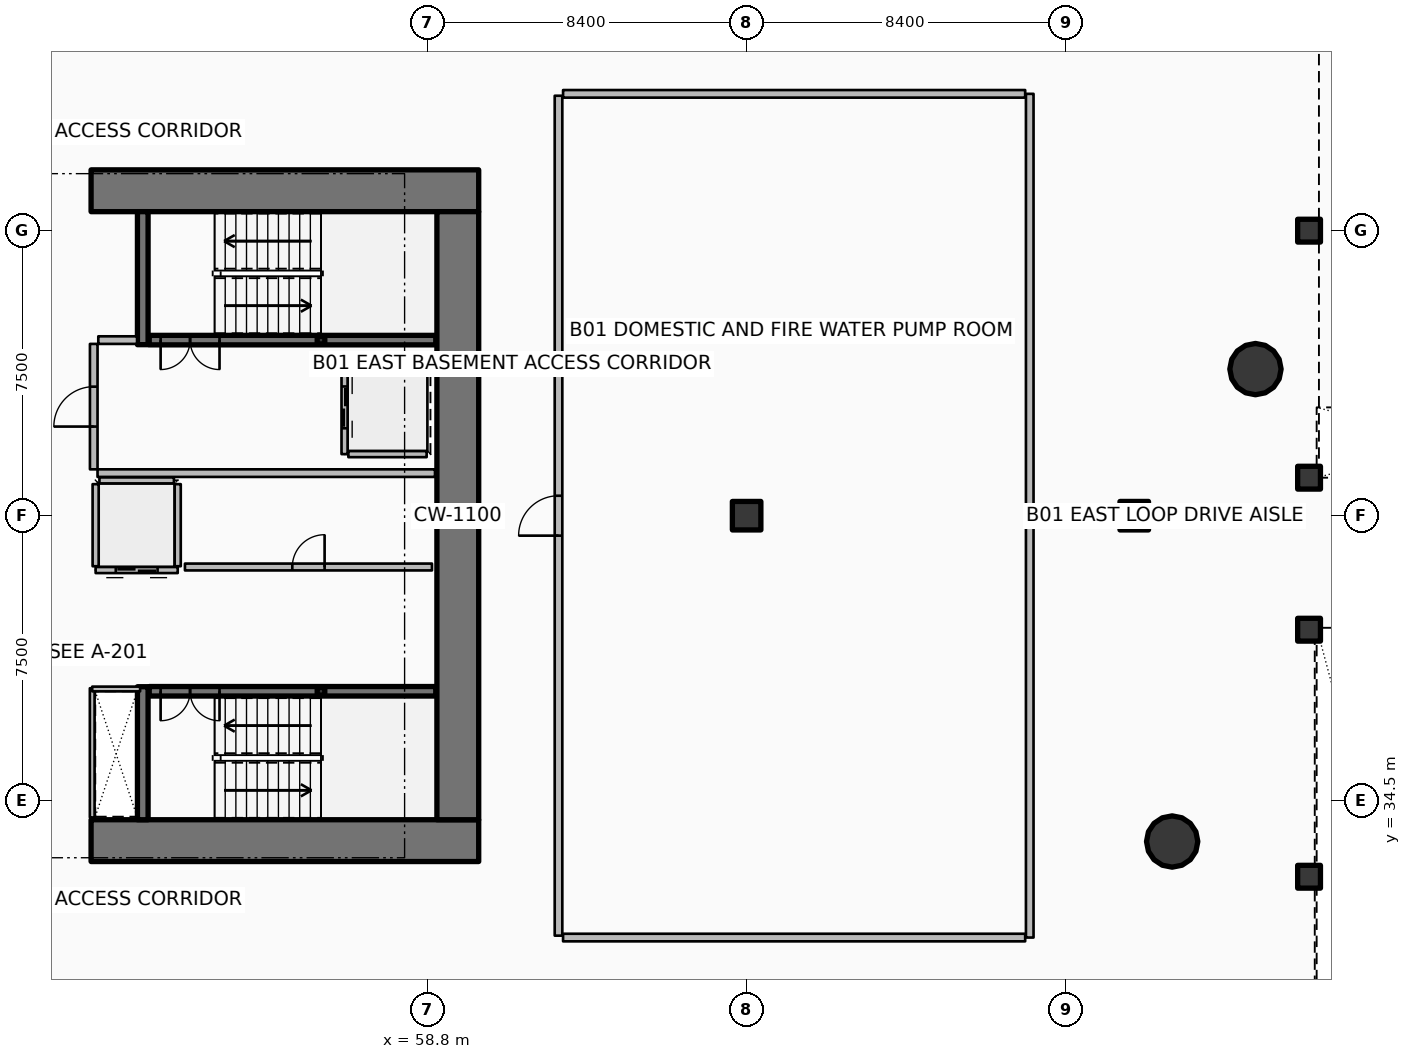
"""IFC4 building model, lengths in metres.
Left out: names, types, materials, properties, quantities, classifications, styles, units other than length and angle.
Written with IfcOpenShell. Run it as: python <this file> out.ifc"""

import sys

from ifc_helpers import new_model, si_unit, direction, frame, frame_2d, origin, origin_2d, place, context, subcontext, project, spatial, rectangle, hollow_rectangle, circle, extrude, element, fill, save


model = new_model("IFC4")
c1 = context("Model", 3, precision=1e-05, world=origin(), true_north=direction((0.0, 1.0)))
c2 = subcontext(c1, "Body", "Model", "MODEL_VIEW")
j1 = project(units=[si_unit("LENGTHUNIT", "METRE"), si_unit("PLANEANGLEUNIT", "RADIAN")], contexts=[c1])
p1 = place(None, origin())
s1 = spatial("IfcSite", under=j1, at=p1, CompositionType="ELEMENT")
p2 = place(p1, origin())
s2 = spatial("IfcBuilding", under=s1, at=p2, CompositionType="ELEMENT")
p3 = place(p2, frame((0.0, 0.0, -3.8)))
s3 = spatial("IfcBuildingStorey", under=s2, at=p3, CompositionType="ELEMENT", Elevation=-3.8)
for number, where, z_axis, x_axis in (
    (1, (67.2, 42.0, 0.0), (0.0, 0.0, 1.0), (1.0, 0.0, 0.0)),
    (2, (77.4, 42.0, 0.0), (0.0, 0.0, 1.0), (1.0, 0.0, 0.0)),
):
    element("IfcColumn", number, at=place(p3, frame(where, z_axis=z_axis, x_axis=x_axis)), inside=s3, PredefinedType="COLUMN", context=c2, shape_type="SweptSolid", body=[
        extrude(rectangle(XDim=0.75, YDim=0.75, at=origin_2d()), origin(), (0.0, 0.0, 1.0), 3.48),
    ])
for number, where, z_axis, x_axis in (
    (3, (82.0, 32.5, 0.0), (0.0, 0.0, 1.0), (1.0, 0.0, 0.0)),
    (4, (82.0, 39.0, 0.0), (0.0, 0.0, 1.0), (1.0, 0.0, 0.0)),
    (5, (82.0, 43.0, 0.0), (0.0, 0.0, 1.0), (1.0, 0.0, 0.0)),
    (6, (82.0, 49.5, 0.0), (0.0, 0.0, 1.0), (1.0, 0.0, 0.0)),
):
    element("IfcColumn", number, at=place(p3, frame(where, z_axis=z_axis, x_axis=x_axis)), inside=s3, PredefinedType="COLUMN", context=c2, shape_type="SweptSolid", body=[
        extrude(rectangle(XDim=0.6, YDim=0.6, at=origin_2d()), origin(), (0.0, 0.0, 1.0), 3.48),
    ])
for number, where, z_axis, x_axis in (
    (7, (49.95, 33.45, 0.0), (0.0, 0.0, 1.0), (1.0, 0.0, 0.0)),
    (8, (49.95, 50.55, 0.0), (0.0, 0.0, 1.0), (1.0, 0.0, 0.0)),
):
    element("IfcWall", number, at=place(p3, frame(where, z_axis=z_axis, x_axis=x_axis)), inside=s3, PredefinedType="SHEAR", context=c2, shape_type="SweptSolid", body=[
        extrude(rectangle(XDim=10.2, YDim=1.1, at=frame_2d((5.1, 0.0))), origin(), (0.0, 0.0, 1.0), 3.8),
    ])
p4 = place(p3, frame((59.6, 34.0, 0.0), z_axis=(0.0, 0.0, 1.0), x_axis=(0.0, 1.0, 0.0)))
e9 = element("IfcWall", 9, at=p4, inside=s3, PredefinedType="SHEAR", context=c2, shape_type="SweptSolid", body=[
    extrude(rectangle(XDim=16.0, YDim=1.1, at=frame_2d((8.0, 0.0))), origin(), (0.0, 0.0, 1.0), 3.8),
])
for number, where, z_axis, x_axis in (
    (10, (51.31, 46.5, 0.0), (0.0, 0.0, 1.0), (0.0, 1.0, 0.0)),
    (11, (51.31, 34.0, 0.0), (0.0, 0.0, 1.0), (0.0, 1.0, 0.0)),
):
    element("IfcWall", number, at=place(p3, frame(where, z_axis=z_axis, x_axis=x_axis)), inside=s3, PredefinedType="SHEAR", context=c2, shape_type="SweptSolid", body=[
        extrude(rectangle(XDim=3.5, YDim=0.28, at=frame_2d((1.75, 0.0))), origin(), (0.0, 0.0, 1.0), 3.8),
    ])
for number, where, z_axis, x_axis in (
    (12, (56.0, 46.62, 0.0), (0.0, 0.0, 1.0), (1.0, 0.0, 0.0)),
    (13, (56.0, 37.38, 0.0), (0.0, 0.0, 1.0), (1.0, 0.0, 0.0)),
):
    element("IfcColumn", number, at=place(p3, frame(where, z_axis=z_axis, x_axis=x_axis)), inside=s3, PredefinedType="COLUMN", context=c2, shape_type="SweptSolid", body=[
        extrude(hollow_rectangle(XDim=0.2, YDim=0.2, WallThickness=0.01, InnerFilletRadius=0.01, OuterFilletRadius=0.02, at=origin_2d()), origin(), (0.0, 0.0, 1.0), 1.695),
    ])
for number, where, z_axis, x_axis in (
    (14, (78.398, 33.427, 0.0), (0.0, 0.0, 1.0), (1.0, 0.0, 0.0)),
    (15, (80.59, 45.857, 0.0), (0.0, 0.0, 1.0), (1.0, 0.0, 0.0)),
):
    element("IfcColumn", number, at=place(p3, frame(where, z_axis=z_axis, x_axis=x_axis)), inside=s3, PredefinedType="COLUMN", context=c2, shape_type="SweptSolid", body=[
        extrude(circle(Radius=0.675, at=origin_2d()), origin(), (0.0, 0.0, 1.0), 3.48),
    ])
p5 = place(p3, frame((51.48, 46.62, 0.0), z_axis=(0.0, 0.0, 1.0), x_axis=(1.0, 0.0, 0.0)))
e16 = element("IfcWall", 16, at=p5, inside=s3, PredefinedType="SOLIDWALL", context=c2, shape_type="SweptSolid", body=[
    extrude(rectangle(XDim=7.54, YDim=0.25, at=frame_2d((3.77, 0.0))), origin(), (0.0, 0.0, 1.0), 3.48),
])
p6 = place(p5, frame((0.3, 0.0, 0.0)))
e17 = element("IfcOpeningElement", 17, at=p6, cuts=e16, PredefinedType="OPENING", context=c2, shape_type="SweptSolid", body=[
    extrude(rectangle(XDim=1.55, YDim=2.15, at=frame_2d((0.775, 1.075))), frame((0.0, 0.135, 0.0), z_axis=(0.0, -1.0, 0.0), x_axis=(1.0, 0.0, 0.0)), (0.0, 0.0, 1.0), 0.27),
])
p7 = place(p3, frame((51.48, 37.38, 0.0), z_axis=(0.0, 0.0, 1.0), x_axis=(1.0, 0.0, 0.0)))
e18 = element("IfcWall", 18, at=p7, inside=s3, PredefinedType="SOLIDWALL", context=c2, shape_type="SweptSolid", body=[
    extrude(rectangle(XDim=7.54, YDim=0.25, at=frame_2d((3.77, 0.0))), origin(), (0.0, 0.0, 1.0), 3.48),
])
p8 = place(p7, frame((0.3, 0.0, 0.0)))
e19 = element("IfcOpeningElement", 19, at=p8, cuts=e18, PredefinedType="OPENING", context=c2, shape_type="SweptSolid", body=[
    extrude(rectangle(XDim=1.55, YDim=2.15, at=frame_2d((0.775, 1.075))), frame((0.0, 0.135, 0.0), z_axis=(0.0, -1.0, 0.0), x_axis=(1.0, 0.0, 0.0)), (0.0, 0.0, 1.0), 0.27),
])
p9 = place(p3, frame((56.62, 46.08, 0.0), z_axis=(0.0, 0.0, 1.0), x_axis=(0.0, -1.0, 0.0)))
e20 = element("IfcWall", 20, at=p9, inside=s3, PredefinedType="PARTITIONING", context=c2, shape_type="SweptSolid", body=[
    extrude(rectangle(XDim=2.46, YDim=0.16, at=frame_2d((1.23, 0.0))), origin(), (0.0, 0.0, 1.0), 3.48),
])
p10 = place(p9, frame((0.68, 0.0, 0.0)))
e21 = element("IfcOpeningElement", 21, at=p10, cuts=e20, PredefinedType="OPENING", context=c2, shape_type="SweptSolid", body=[
    extrude(rectangle(XDim=1.1, YDim=2.1, at=frame_2d((0.55, 1.05))), frame((0.0, 0.09, 0.0), z_axis=(0.0, -1.0, 0.0), x_axis=(1.0, 0.0, 0.0)), (0.0, 0.0, 1.0), 0.18),
])
for number, where, z_axis, x_axis in (
    (22, (56.72, 46.08, 0.0), (0.0, 0.0, 1.0), (1.0, 0.0, 0.0)),
    (23, (56.72, 43.62, 0.0), (0.0, 0.0, 1.0), (1.0, 0.0, 0.0)),
):
    element("IfcWall", number, at=place(p3, frame(where, z_axis=z_axis, x_axis=x_axis)), inside=s3, PredefinedType="PARTITIONING", context=c2, shape_type="SweptSolid", body=[
        extrude(rectangle(XDim=2.06, YDim=0.16, at=frame_2d((1.03, 0.0))), origin(), (0.0, 0.0, 1.0), 3.48),
    ])
p11 = place(p3, frame((52.23, 40.57, 0.0), z_axis=(0.0, 0.0, 1.0), x_axis=(-1.0, 0.0, 0.0)))
e24 = element("IfcWall", 24, at=p11, inside=s3, PredefinedType="PARTITIONING", context=c2, shape_type="SweptSolid", body=[
    extrude(rectangle(XDim=2.16, YDim=0.16, at=frame_2d((1.08, 0.0))), origin(), (0.0, 0.0, 1.0), 3.48),
])
p12 = place(p11, frame((0.53, 0.0, 0.0)))
e25 = element("IfcOpeningElement", 25, at=p12, cuts=e24, PredefinedType="OPENING", context=c2, shape_type="SweptSolid", body=[
    extrude(rectangle(XDim=1.1, YDim=2.1, at=frame_2d((0.55, 1.05))), frame((0.0, 0.09, 0.0), z_axis=(0.0, -1.0, 0.0), x_axis=(1.0, 0.0, 0.0)), (0.0, 0.0, 1.0), 0.18),
])
for number, where, z_axis, x_axis in (
    (26, (52.23, 40.67, 0.0), (0.0, 0.0, 1.0), (0.0, 1.0, 0.0)),
    (27, (50.07, 40.67, 0.0), (0.0, 0.0, 1.0), (0.0, 1.0, 0.0)),
):
    element("IfcWall", number, at=place(p3, frame(where, z_axis=z_axis, x_axis=x_axis)), inside=s3, PredefinedType="PARTITIONING", context=c2, shape_type="SweptSolid", body=[
        extrude(rectangle(XDim=2.16, YDim=0.16, at=frame_2d((1.08, 0.0))), origin(), (0.0, 0.0, 1.0), 3.48),
    ])
p13 = place(p3, frame((50.17, 42.93, 0.0), z_axis=(0.0, 0.0, 1.0), x_axis=(1.0, 0.0, 0.0)))
e28 = element("IfcWall", 28, at=p13, inside=s3, PredefinedType="PARTITIONING", context=c2, shape_type="SweptSolid", body=[
    extrude(rectangle(XDim=1.96, YDim=0.16, at=frame_2d((0.98, 0.0))), origin(), (0.0, 0.0, 1.0), 3.48),
])
p14 = place(p3, frame((52.42, 40.65, 0.0), z_axis=(0.0, 0.0, 1.0), x_axis=(1.0, 0.0, 0.0)))
e29 = element("IfcWall", 29, at=p14, inside=s3, PredefinedType="PARTITIONING", context=c2, shape_type="SweptSolid", body=[
    extrude(rectangle(XDim=6.5, YDim=0.18, at=frame_2d((3.25, 0.0))), origin(), (0.0, 0.0, 1.0), 3.48),
])
p15 = place(p14, frame((2.825, 0.0, 0.0)))
e30 = element("IfcOpeningElement", 30, at=p15, cuts=e29, PredefinedType="OPENING", context=c2, shape_type="SweptSolid", body=[
    extrude(rectangle(XDim=0.85, YDim=2.06, at=frame_2d((0.425, 1.03))), frame((0.0, 0.1, 0.0), z_axis=(0.0, -1.0, 0.0), x_axis=(1.0, 0.0, 0.0)), (0.0, 0.0, 1.0), 0.2),
])
p16 = place(p3, frame((50.12, 43.12, 0.0), z_axis=(0.0, 0.0, 1.0), x_axis=(1.0, 0.0, 0.0)))
e31 = element("IfcWall", 31, at=p16, inside=s3, PredefinedType="PARTITIONING", context=c2, shape_type="SweptSolid", body=[
    extrude(rectangle(XDim=8.88, YDim=0.2, at=frame_2d((4.44, 0.0))), origin(), (0.0, 0.0, 1.0), 3.48),
])
p17 = place(p3, frame((50.14, 46.62, 0.0), z_axis=(0.0, 0.0, 1.0), x_axis=(1.0, 0.0, 0.0)))
e32 = element("IfcWall", 32, at=p17, inside=s3, PredefinedType="PARTITIONING", context=c2, shape_type="SweptSolid", body=[
    extrude(rectangle(XDim=1.02, YDim=0.2, at=frame_2d((0.51, 0.0))), origin(), (0.0, 0.0, 1.0), 3.48),
])
p18 = place(p3, frame((50.02, 43.22, 0.0), z_axis=(0.0, 0.0, 1.0), x_axis=(0.0, 1.0, 0.0)))
e33 = element("IfcWall", 33, at=p18, inside=s3, PredefinedType="PARTITIONING", context=c2, shape_type="SweptSolid", body=[
    extrude(rectangle(XDim=3.3, YDim=0.2, at=frame_2d((1.65, 0.0))), origin(), (0.0, 0.0, 1.0), 3.48),
])
p19 = place(p18, frame((1.125, 0.0, 0.0)))
e34 = element("IfcOpeningElement", 34, at=p19, cuts=e33, PredefinedType="OPENING", context=c2, shape_type="SweptSolid", body=[
    extrude(rectangle(XDim=1.05, YDim=2.1, at=frame_2d((0.525, 1.05))), frame((0.0, 0.11, 0.0), z_axis=(0.0, -1.0, 0.0), x_axis=(1.0, 0.0, 0.0)), (0.0, 0.0, 1.0), 0.22),
])
p20 = place(p3, frame((49.98, 34.06, 0.0), z_axis=(0.0, 0.0, 1.0), x_axis=(0.0, 1.0, 0.0)))
e35 = element("IfcWall", 35, at=p20, inside=s3, PredefinedType="PARTITIONING", context=c2, shape_type="SweptSolid", body=[
    extrude(rectangle(XDim=3.4, YDim=0.125, at=frame_2d((1.7, 0.0))), origin(), (0.0, 0.0, 1.0), 2.92),
])
p21 = place(p3, frame((49.98, 37.44, 0.0), z_axis=(0.0, 0.0, 1.0), x_axis=(1.0, 0.0, 0.0)))
e36 = element("IfcWall", 36, at=p21, inside=s3, PredefinedType="PARTITIONING", context=c2, shape_type="SweptSolid", body=[
    extrude(rectangle(XDim=1.26, YDim=0.125, at=frame_2d((0.63, 0.0))), origin(), (0.0, 0.0, 1.0), 2.92),
])
p22 = place(p3, frame((74.65, 30.9, 0.0), z_axis=(0.0, 0.0, 1.0), x_axis=(0.0, 1.0, 0.0)))
e37 = element("IfcWall", 37, at=p22, inside=s3, PredefinedType="PARTITIONING", context=c2, shape_type="SweptSolid", body=[
    extrude(rectangle(XDim=22.2, YDim=0.2, at=frame_2d((11.1, 0.0))), origin(), (0.0, 0.0, 1.0), 2.771),
])
for number, where, z_axis, x_axis in (
    (38, (62.37, 53.1, 0.0), (0.0, 0.0, 1.0), (1.0, 0.0, 0.0)),
    (39, (62.37, 30.9, 0.0), (0.0, 0.0, 1.0), (1.0, 0.0, 0.0)),
):
    element("IfcWall", number, at=place(p3, frame(where, z_axis=z_axis, x_axis=x_axis)), inside=s3, PredefinedType="PARTITIONING", context=c2, shape_type="SweptSolid", body=[
        extrude(rectangle(XDim=12.16, YDim=0.2, at=frame_2d((6.08, 0.0))), origin(), (0.0, 0.0, 1.0), 2.771),
    ])
p23 = place(p3, frame((62.25, 30.95, 0.0), z_axis=(0.0, 0.0, 1.0), x_axis=(0.0, 1.0, 0.0)))
e40 = element("IfcWall", 40, at=p23, inside=s3, PredefinedType="PARTITIONING", context=c2, shape_type="SweptSolid", body=[
    extrude(rectangle(XDim=22.1, YDim=0.2, at=frame_2d((11.05, 0.0))), origin(), (0.0, 0.0, 1.0), 2.771),
])
p24 = place(p23, frame((10.525, 0.0, 0.0)))
e41 = element("IfcOpeningElement", 41, at=p24, cuts=e40, PredefinedType="OPENING", context=c2, shape_type="SweptSolid", body=[
    extrude(rectangle(XDim=1.05, YDim=2.1, at=frame_2d((0.525, 1.05))), frame((0.0, 0.11, 0.0), z_axis=(0.0, -1.0, 0.0), x_axis=(1.0, 0.0, 0.0)), (0.0, 0.0, 1.0), 0.22),
])
p25 = place(p6, origin())
e42 = element("IfcDoor", 42, at=p25, inside=s3, OperationType="DOUBLE_DOOR_SINGLE_SWING", PredefinedType="DOOR", context=c2, shape_type="SweptSolid", body=[
    extrude(rectangle(XDim=1.55, YDim=2.15, at=frame_2d((0.775, 1.075))), frame((0.0, 0.025, 0.0), z_axis=(0.0, -1.0, 0.0), x_axis=(1.0, 0.0, 0.0)), (0.0, 0.0, 1.0), 0.05),
])
fill(e17, e42)
p26 = place(p8, origin())
e43 = element("IfcDoor", 43, at=p26, inside=s3, OperationType="DOUBLE_DOOR_SINGLE_SWING", PredefinedType="DOOR", context=c2, shape_type="SweptSolid", body=[
    extrude(rectangle(XDim=1.55, YDim=2.15, at=frame_2d((0.775, 1.075))), frame((0.0, 0.025, 0.0), z_axis=(0.0, -1.0, 0.0), x_axis=(1.0, 0.0, 0.0)), (0.0, 0.0, 1.0), 0.05),
])
fill(e19, e43)
p27 = place(p10, origin())
e44 = element("IfcDoor", 44, at=p27, inside=s3, OperationType="DOUBLE_DOOR_SLIDING", PredefinedType="DOOR", context=c2, shape_type="SweptSolid", body=[
    extrude(rectangle(XDim=1.1, YDim=2.1, at=frame_2d((0.55, 1.05))), frame((0.0, 0.025, 0.0), z_axis=(0.0, -1.0, 0.0), x_axis=(1.0, 0.0, 0.0)), (0.0, 0.0, 1.0), 0.05),
])
fill(e21, e44)
p28 = place(p12, origin())
e45 = element("IfcDoor", 45, at=p28, inside=s3, OperationType="DOUBLE_DOOR_SLIDING", PredefinedType="DOOR", context=c2, shape_type="SweptSolid", body=[
    extrude(rectangle(XDim=1.1, YDim=2.1, at=frame_2d((0.55, 1.05))), frame((0.0, 0.025, 0.0), z_axis=(0.0, -1.0, 0.0), x_axis=(1.0, 0.0, 0.0)), (0.0, 0.0, 1.0), 0.05),
])
fill(e25, e45)
p29 = place(p15, origin())
e46 = element("IfcDoor", 46, at=p29, inside=s3, OperationType="SINGLE_SWING_RIGHT", PredefinedType="DOOR", context=c2, shape_type="SweptSolid", body=[
    extrude(rectangle(XDim=0.85, YDim=2.06, at=frame_2d((0.425, 1.03))), frame((0.0, 0.025, 0.0), z_axis=(0.0, -1.0, 0.0), x_axis=(1.0, 0.0, 0.0)), (0.0, 0.0, 1.0), 0.05),
])
fill(e30, e46)
p30 = place(p19, origin())
e47 = element("IfcDoor", 47, at=p30, inside=s3, OperationType="SINGLE_SWING_LEFT", PredefinedType="DOOR", context=c2, shape_type="SweptSolid", body=[
    extrude(rectangle(XDim=1.05, YDim=2.1, at=frame_2d((0.525, 1.05))), frame((0.0, 0.025, 0.0), z_axis=(0.0, -1.0, 0.0), x_axis=(1.0, 0.0, 0.0)), (0.0, 0.0, 1.0), 0.05),
])
fill(e34, e47)
p31 = place(p24, origin())
e48 = element("IfcDoor", 48, at=p31, inside=s3, OperationType="SINGLE_SWING_LEFT", PredefinedType="DOOR", context=c2, shape_type="SweptSolid", body=[
    extrude(rectangle(XDim=1.05, YDim=2.1, at=frame_2d((0.525, 1.05))), frame((0.0, 0.025, 0.0), z_axis=(0.0, -1.0, 0.0), x_axis=(1.0, 0.0, 0.0)), (0.0, 0.0, 1.0), 0.05),
])
fill(e41, e48)
save(model, sys.argv[1])
